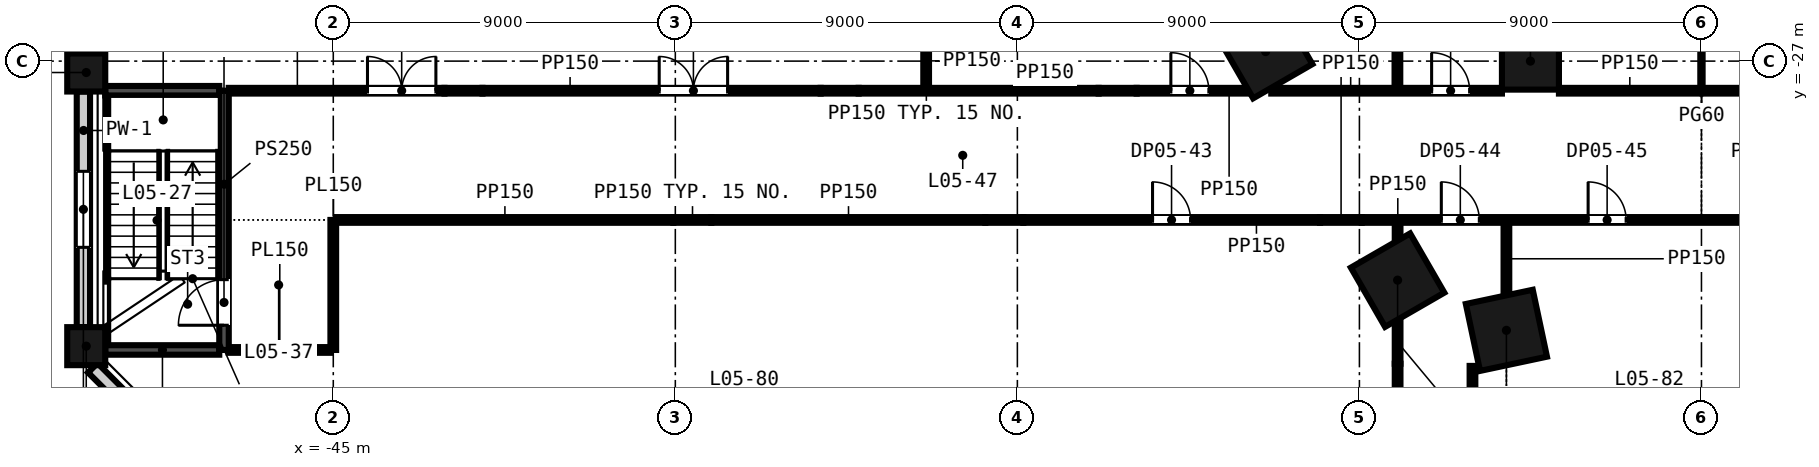
"""IFC4 building model, lengths in metres.
Left out: names, types, materials, properties, quantities, classifications, styles, units other than length and angle.
Written with IfcOpenShell. Run it as: python <this file> out.ifc"""

import sys

from ifc_helpers import new_model, si_unit, direction, frame, frame_2d, origin, origin_2d, place, context, subcontext, project, spatial, rectangle, extrude, element, fill, save


model = new_model("IFC4")
c1 = context("Model", 3, precision=1e-05, world=origin(), true_north=direction((0.0, 1.0)))
c2 = subcontext(c1, "Body", "Model", "MODEL_VIEW")
j1 = project(units=[si_unit("LENGTHUNIT", "METRE"), si_unit("PLANEANGLEUNIT", "RADIAN")], contexts=[c1])
p1 = place(None, origin())
s1 = spatial("IfcSite", under=j1, at=p1, CompositionType="ELEMENT")
p2 = place(p1, origin())
s2 = spatial("IfcBuilding", under=s1, at=p2, CompositionType="ELEMENT")
p3 = place(p2, frame((0.0, 0.0, 31.5)))
s3 = spatial("IfcBuildingStorey", under=s2, at=p3, CompositionType="ELEMENT", Elevation=31.5)
for number, where, z_axis, x_axis in (
    (1, (-20.467, -26.75, -0.3), (0.0, 0.0, 1.0), (0.5, -0.866, 0.0)),
    (2, (-16.995, -32.763, -0.3), (0.0, 0.0, 1.0), (0.5, -0.866, 0.0)),
    (3, (-14.132, -34.084, -0.3), (0.0, 0.0, 1.0), (0.978, 0.208, 0.0)),
):
    element("IfcColumn", number, at=place(p3, frame(where, z_axis=z_axis, x_axis=x_axis)), inside=s3, PredefinedType="COLUMN", context=c2, shape_type="SweptSolid", body=[
        extrude(rectangle(XDim=1.8, YDim=1.8, at=origin_2d()), origin(), (0.0, 0.0, 1.0), 4.65),
    ])
p4 = place(p3, frame((-13.5, -27.0, -0.3), z_axis=(0.0, 0.0, 1.0), x_axis=(1.0, 0.0, 0.0)))
e4 = element("IfcColumn", 4, at=p4, inside=s3, PredefinedType="COLUMN", context=c2, shape_type="SweptSolid", body=[
    extrude(rectangle(XDim=1.5, YDim=1.5, at=origin_2d()), origin(), (0.0, 0.0, 1.0), 4.65),
])
for number, where, z_axis, x_axis in (
    (5, (-51.5, -34.5, -0.3), (0.0, 0.0, 1.0), (0.0, -1.0, 0.0)),
    (6, (-51.5, -27.3, -0.3), (0.0, 0.0, 1.0), (0.0, 1.0, 0.0)),
):
    element("IfcColumn", number, at=place(p3, frame(where, z_axis=z_axis, x_axis=x_axis)), inside=s3, PredefinedType="COLUMN", context=c2, shape_type="SweptSolid", body=[
        extrude(rectangle(XDim=1.0, YDim=1.0, at=origin_2d()), origin(), (0.0, 0.0, 1.0), 4.65),
    ])
p5 = place(p3, frame((-51.575, -9.2, -0.3), z_axis=(0.0, 0.0, 1.0), x_axis=(0.0, -1.0, 0.0)))
e7 = element("IfcWall", 7, at=p5, inside=s3, PredefinedType="SOLIDWALL", context=c2, shape_type="SweptSolid", body=[
    extrude(rectangle(XDim=17.6, YDim=0.35, at=frame_2d((8.8, 0.0))), origin(), (0.0, 0.0, 1.0), 3.75),
])
p6 = place(p3, frame((-51.575, -27.8, -0.3), z_axis=(0.0, 0.0, 1.0), x_axis=(0.0, -1.0, 0.0)))
e8 = element("IfcWall", 8, at=p6, inside=s3, PredefinedType="SOLIDWALL", context=c2, shape_type="SweptSolid", body=[
    extrude(rectangle(XDim=6.2, YDim=0.35, at=frame_2d((3.1, 0.0))), origin(), (0.0, 0.0, 1.0), 3.75),
])
p7 = place(p6, frame((2.1, 0.0, 1.2)))
e9 = element("IfcOpeningElement", 9, at=p7, cuts=e8, PredefinedType="OPENING", context=c2, shape_type="SweptSolid", body=[
    extrude(rectangle(XDim=2.0, YDim=2.5, at=frame_2d((1.0, 1.25))), frame((0.0, 0.185, 0.0), z_axis=(0.0, -1.0, 0.0), x_axis=(1.0, 0.0, 0.0)), (0.0, 0.0, 1.0), 0.37),
])
p8 = place(p3, frame((-51.327, -35.072, -0.3), z_axis=(0.0, 0.0, 1.0), x_axis=(0.707106781187, -0.707106781187, 0.0)))
e10 = element("IfcWall", 10, at=p8, inside=s3, PredefinedType="SOLIDWALL", context=c2, shape_type="SweptSolid", body=[
    extrude(rectangle(XDim=7.433, YDim=0.35, at=frame_2d((3.716, 0.0))), origin(), (0.0, 0.0, 1.0), 3.75),
])
p9 = place(p3, frame((-51.0, -34.6, 0.0), z_axis=(0.0, 0.0, 1.0), x_axis=(1.0, 0.0, 0.0)))
e11 = element("IfcWall", 11, at=p9, inside=s3, PredefinedType="SHEAR", context=c2, shape_type="SweptSolid", body=[
    extrude(rectangle(XDim=3.0, YDim=0.25, at=frame_2d((1.5, 0.0))), origin(), (0.0, 0.0, 1.0), 4.35),
])
p10 = place(p3, frame((-47.75, -34.6, 0.0), z_axis=(0.0, 0.0, 1.0), x_axis=(1.0, 0.0, 0.0)))
e12 = element("IfcWall", 12, at=p10, inside=s3, PredefinedType="PARTITIONING", context=c2, shape_type="SweptSolid", body=[
    extrude(rectangle(XDim=2.675, YDim=0.15, at=frame_2d((1.337, 0.0))), origin(), (0.0, 0.0, 1.0), 4.35),
])
p11 = place(p3, frame((-44.925, -31.179, 0.0), z_axis=(0.0, 0.0, 1.0), x_axis=(1.0, 0.0, 0.0)))
e13 = element("IfcWall", 13, at=p11, inside=s3, PredefinedType="PARTITIONING", context=c2, shape_type="SweptSolid", body=[
    extrude(rectangle(XDim=8.872, YDim=0.15, at=frame_2d((4.436, 0.0))), origin(), (0.0, 0.0, 1.0), 4.35),
])
p12 = place(p3, frame((-36.053, -31.179, 0.0), z_axis=(0.0, 0.0, 1.0), x_axis=(1.0, 0.0, 0.0)))
e14 = element("IfcWall", 14, at=p12, inside=s3, PredefinedType="PARTITIONING", context=c2, shape_type="SweptSolid", body=[
    extrude(rectangle(XDim=1.0, YDim=0.15, at=frame_2d((0.5, 0.0))), origin(), (0.0, 0.0, 1.0), 3.261),
])
p13 = place(p3, frame((-35.053, -31.179, 0.0), z_axis=(0.0, 0.0, 1.0), x_axis=(1.0, 0.0, 0.0)))
e15 = element("IfcWall", 15, at=p13, inside=s3, PredefinedType="PARTITIONING", context=c2, shape_type="SweptSolid", body=[
    extrude(rectangle(XDim=7.209, YDim=0.15, at=frame_2d((3.605, 0.0))), origin(), (0.0, 0.0, 1.0), 4.35),
])
p14 = place(p3, frame((-27.843, -31.179, 0.0), z_axis=(0.0, 0.0, 1.0), x_axis=(1.0, 0.0, 0.0)))
e16 = element("IfcWall", 16, at=p14, inside=s3, PredefinedType="PARTITIONING", context=c2, shape_type="SweptSolid", body=[
    extrude(rectangle(XDim=1.0, YDim=0.15, at=frame_2d((0.5, 0.0))), origin(), (0.0, 0.0, 1.0), 3.436),
])
p15 = place(p3, frame((-26.843, -31.179, 0.0), z_axis=(0.0, 0.0, 1.0), x_axis=(1.0, 0.0, 0.0)))
e17 = element("IfcWall", 17, at=p15, inside=s3, PredefinedType="PARTITIONING", context=c2, shape_type="SweptSolid", body=[
    extrude(rectangle(XDim=7.807, YDim=0.15, at=frame_2d((3.904, 0.0))), origin(), (0.0, 0.0, 1.0), 4.35),
])
p16 = place(p15, frame((3.4, 0.0, 0.0)))
e18 = element("IfcOpeningElement", 18, at=p16, cuts=e17, PredefinedType="OPENING", context=c2, shape_type="SweptSolid", body=[
    extrude(rectangle(XDim=1.0, YDim=2.1, at=frame_2d((0.5, 1.05))), frame((0.0, 0.085, 0.0), z_axis=(0.0, -1.0, 0.0), x_axis=(1.0, 0.0, 0.0)), (0.0, 0.0, 1.0), 0.17),
])
p17 = place(p3, frame((-19.036, -31.179, 0.0), z_axis=(0.0, 0.0, 1.0), x_axis=(1.0, 0.0, 0.0)))
e19 = element("IfcWall", 19, at=p17, inside=s3, PredefinedType="PARTITIONING", context=c2, shape_type="SweptSolid", body=[
    extrude(rectangle(XDim=1.097, YDim=0.15, at=frame_2d((0.548, 0.0))), origin(), (0.0, 0.0, 1.0), 3.5),
])
p18 = place(p3, frame((-17.939, -31.179, 0.0), z_axis=(0.0, 0.0, 1.0), x_axis=(1.0, 0.0, 0.0)))
e20 = element("IfcWall", 20, at=p18, inside=s3, PredefinedType="PARTITIONING", context=c2, shape_type="SweptSolid", body=[
    extrude(rectangle(XDim=17.593, YDim=0.15, at=frame_2d((8.796, 0.0))), origin(), (0.0, 0.0, 1.0), 4.35),
])
p19 = place(p18, frame((2.094, 0.0, 0.0)))
e21 = element("IfcOpeningElement", 21, at=p19, cuts=e20, PredefinedType="OPENING", context=c2, shape_type="SweptSolid", body=[
    extrude(rectangle(XDim=1.0, YDim=2.1, at=frame_2d((0.5, 1.05))), frame((0.0, 0.085, 0.0), z_axis=(0.0, -1.0, 0.0), x_axis=(1.0, 0.0, 0.0)), (0.0, 0.0, 1.0), 0.17),
])
p20 = place(p18, frame((5.957, 0.0, 0.0)))
e22 = element("IfcOpeningElement", 22, at=p20, cuts=e20, PredefinedType="OPENING", context=c2, shape_type="SweptSolid", body=[
    extrude(rectangle(XDim=1.0, YDim=2.1, at=frame_2d((0.5, 1.05))), frame((0.0, 0.085, 0.0), z_axis=(0.0, -1.0, 0.0), x_axis=(1.0, 0.0, 0.0)), (0.0, 0.0, 1.0), 0.17),
])
p21 = place(p18, frame((13.978, 0.0, 0.0)))
e23 = element("IfcOpeningElement", 23, at=p21, cuts=e20, PredefinedType="OPENING", context=c2, shape_type="SweptSolid", body=[
    extrude(rectangle(XDim=1.0, YDim=2.1, at=frame_2d((0.5, 1.05))), frame((0.0, 0.085, 0.0), z_axis=(0.0, -1.0, 0.0), x_axis=(1.0, 0.0, 0.0)), (0.0, 0.0, 1.0), 0.17),
])
p22 = place(p3, frame((-51.0, -27.779, 0.0), z_axis=(0.0, 0.0, 1.0), x_axis=(1.0, 0.0, 0.0)))
e24 = element("IfcWall", 24, at=p22, inside=s3, PredefinedType="SHEAR", context=c2, shape_type="SweptSolid", body=[
    extrude(rectangle(XDim=3.0, YDim=0.25, at=frame_2d((1.5, 0.0))), origin(), (0.0, 0.0, 1.0), 4.35),
])
p23 = place(p3, frame((-47.75, -27.779, 0.0), z_axis=(0.0, 0.0, 1.0), x_axis=(1.0, 0.0, 0.0)))
e25 = element("IfcWall", 25, at=p23, inside=s3, PredefinedType="PARTITIONING", context=c2, shape_type="SweptSolid", body=[
    extrude(rectangle(XDim=5.676, YDim=0.15, at=frame_2d((2.838, 0.0))), origin(), (0.0, 0.0, 1.0), 4.35),
])
p24 = place(p23, frame((3.65, 0.0, 0.0)))
e26 = element("IfcOpeningElement", 26, at=p24, cuts=e25, PredefinedType="OPENING", context=c2, shape_type="SweptSolid", body=[
    extrude(rectangle(XDim=1.8, YDim=2.4, at=frame_2d((0.9, 1.2))), frame((0.0, 0.085, 0.0), z_axis=(0.0, -1.0, 0.0), x_axis=(1.0, 0.0, 0.0)), (0.0, 0.0, 1.0), 0.17),
])
p25 = place(p3, frame((-42.074, -27.779, 0.0), z_axis=(0.0, 0.0, 1.0), x_axis=(1.0, 0.0, 0.0)))
e27 = element("IfcWall", 27, at=p25, inside=s3, PredefinedType="PARTITIONING", context=c2, shape_type="SweptSolid", body=[
    extrude(rectangle(XDim=1.0, YDim=0.15, at=frame_2d((0.5, 0.0))), origin(), (0.0, 0.0, 1.0), 3.261),
])
p26 = place(p3, frame((-41.074, -27.779, 0.0), z_axis=(0.0, 0.0, 1.0), x_axis=(1.0, 0.0, 0.0)))
e28 = element("IfcWall", 28, at=p26, inside=s3, PredefinedType="PARTITIONING", context=c2, shape_type="SweptSolid", body=[
    extrude(rectangle(XDim=8.898, YDim=0.15, at=frame_2d((4.449, 0.0))), origin(), (0.0, 0.0, 1.0), 4.35),
])
p27 = place(p26, frame((4.65, 0.0, 0.0)))
e29 = element("IfcOpeningElement", 29, at=p27, cuts=e28, PredefinedType="OPENING", context=c2, shape_type="SweptSolid", body=[
    extrude(rectangle(XDim=1.8, YDim=2.4, at=frame_2d((0.9, 1.2))), frame((0.0, 0.085, 0.0), z_axis=(0.0, -1.0, 0.0), x_axis=(1.0, 0.0, 0.0)), (0.0, 0.0, 1.0), 0.17),
])
p28 = place(p3, frame((-32.176, -27.779, 0.0), z_axis=(0.0, 0.0, 1.0), x_axis=(1.0, 0.0, 0.0)))
e30 = element("IfcWall", 30, at=p28, inside=s3, PredefinedType="PARTITIONING", context=c2, shape_type="SweptSolid", body=[
    extrude(rectangle(XDim=1.0, YDim=0.15, at=frame_2d((0.5, 0.0))), origin(), (0.0, 0.0, 1.0), 3.261),
])
p29 = place(p3, frame((-31.176, -27.779, 0.0), z_axis=(0.0, 0.0, 1.0), x_axis=(1.0, 0.0, 0.0)))
e31 = element("IfcWall", 31, at=p29, inside=s3, PredefinedType="PARTITIONING", context=c2, shape_type="SweptSolid", body=[
    extrude(rectangle(XDim=6.314, YDim=0.15, at=frame_2d((3.157, 0.0))), origin(), (0.0, 0.0, 1.0), 4.35),
])
p30 = place(p3, frame((-24.862, -27.779, 0.0), z_axis=(0.0, 0.0, 1.0), x_axis=(1.0, 0.0, 0.0)))
e32 = element("IfcWall", 32, at=p30, inside=s3, PredefinedType="PARTITIONING", context=c2, shape_type="SweptSolid", body=[
    extrude(rectangle(XDim=1.0, YDim=0.15, at=frame_2d((0.5, 0.0))), origin(), (0.0, 0.0, 1.0), 3.436),
])
p31 = place(p3, frame((-23.862, -27.779, 0.0), z_axis=(0.0, 0.0, 1.0), x_axis=(1.0, 0.0, 0.0)))
e33 = element("IfcWall", 33, at=p31, inside=s3, PredefinedType="PARTITIONING", context=c2, shape_type="SweptSolid", body=[
    extrude(rectangle(XDim=2.906, YDim=0.15, at=frame_2d((1.453, 0.0))), origin(), (0.0, 0.0, 1.0), 4.35),
])
p32 = place(p31, frame((0.9, 0.0, 0.0)))
e34 = element("IfcOpeningElement", 34, at=p32, cuts=e33, PredefinedType="OPENING", context=c2, shape_type="SweptSolid", body=[
    extrude(rectangle(XDim=1.0, YDim=2.1, at=frame_2d((0.5, 1.05))), frame((0.0, 0.085, 0.0), z_axis=(0.0, -1.0, 0.0), x_axis=(1.0, 0.0, 0.0)), (0.0, 0.0, 1.0), 0.17),
])
p33 = place(p3, frame((-20.319, -27.779, 0.0), z_axis=(0.0, 0.0, 1.0), x_axis=(1.0, 0.0, 0.0)))
e35 = element("IfcWall", 35, at=p33, inside=s3, PredefinedType="PARTITIONING", context=c2, shape_type="SweptSolid", body=[
    extrude(rectangle(XDim=6.069, YDim=0.15, at=frame_2d((3.035, 0.0))), origin(), (0.0, 0.0, 1.0), 4.35),
])
p34 = place(p33, frame((4.219, 0.0, 0.0)))
e36 = element("IfcOpeningElement", 36, at=p34, cuts=e35, PredefinedType="OPENING", context=c2, shape_type="SweptSolid", body=[
    extrude(rectangle(XDim=1.0, YDim=2.1, at=frame_2d((0.5, 1.05))), frame((0.0, 0.085, 0.0), z_axis=(0.0, -1.0, 0.0), x_axis=(1.0, 0.0, 0.0)), (0.0, 0.0, 1.0), 0.17),
])
p35 = place(p3, frame((-12.75, -27.779, 0.0), z_axis=(0.0, 0.0, 1.0), x_axis=(1.0, 0.0, 0.0)))
e37 = element("IfcWall", 37, at=p35, inside=s3, PredefinedType="PARTITIONING", context=c2, shape_type="SweptSolid", body=[
    extrude(rectangle(XDim=3.72, YDim=0.15, at=frame_2d((1.86, 0.0))), origin(), (0.0, 0.0, 1.0), 4.35),
])
p36 = place(p3, frame((-8.97, -27.779, 0.0), z_axis=(0.0, 0.0, 1.0), x_axis=(1.0, 0.0, 0.0)))
e38 = element("IfcWall", 38, at=p36, inside=s3, PredefinedType="PARTITIONING", context=c2, shape_type="SweptSolid", body=[
    extrude(rectangle(XDim=8.22, YDim=0.15, at=frame_2d((4.11, 0.0))), origin(), (0.0, 0.0, 1.0), 4.35),
])
p37 = place(p3, frame((-47.875, -34.6, 0.0), z_axis=(0.0, 0.0, 1.0), x_axis=(0.0, 1.0, 0.0)))
e39 = element("IfcWall", 39, at=p37, inside=s3, PredefinedType="SHEAR", context=c2, shape_type="SweptSolid", body=[
    extrude(rectangle(XDim=6.821, YDim=0.25, at=frame_2d((3.411, 0.0))), origin(), (0.0, 0.0, 1.0), 4.35),
])
p38 = place(p37, frame((0.65, 0.0, 0.0)))
e40 = element("IfcOpeningElement", 40, at=p38, cuts=e39, PredefinedType="OPENING", context=c2, shape_type="SweptSolid", body=[
    extrude(rectangle(XDim=1.2, YDim=2.1, at=frame_2d((0.6, 1.05))), frame((0.0, 0.135, 0.0), z_axis=(0.0, -1.0, 0.0), x_axis=(1.0, 0.0, 0.0)), (0.0, 0.0, 1.0), 0.27),
])
p39 = place(p3, frame((-45.0, -34.6, 0.0), z_axis=(0.0, 0.0, 1.0), x_axis=(0.0, 1.0, 0.0)))
e41 = element("IfcWall", 41, at=p39, inside=s3, PredefinedType="PARTITIONING", context=c2, shape_type="SweptSolid", body=[
    extrude(rectangle(XDim=3.421, YDim=0.15, at=frame_2d((1.71, 0.0))), origin(), (0.0, 0.0, 1.0), 4.35),
])
p40 = place(p3, frame((-29.4, -27.704, 0.0), z_axis=(0.0, 0.0, 1.0), x_axis=(0.0, 1.0, 0.0)))
e42 = element("IfcWall", 42, at=p40, inside=s3, PredefinedType="PARTITIONING", context=c2, shape_type="SweptSolid", body=[
    extrude(rectangle(XDim=1.421, YDim=0.15, at=frame_2d((0.71, 0.0))), origin(), (0.0, 0.0, 1.0), 4.35),
])
p41 = place(p3, frame((-17.0, -27.704, 0.0), z_axis=(0.0, 0.0, 1.0), x_axis=(0.0, 1.0, 0.0)))
e43 = element("IfcWall", 43, at=p41, inside=s3, PredefinedType="PARTITIONING", context=c2, shape_type="SweptSolid", body=[
    extrude(rectangle(XDim=12.14, YDim=0.15, at=frame_2d((6.07, 0.0))), origin(), (0.0, 0.0, 1.0), 4.35),
])
p42 = place(p3, frame((-16.995, -40.4, 0.0), z_axis=(0.0, 0.0, 1.0), x_axis=(0.0, 1.0, 0.0)))
e44 = element("IfcWall", 44, at=p42, inside=s3, PredefinedType="PARTITIONING", context=c2, shape_type="SweptSolid", body=[
    extrude(rectangle(XDim=5.438, YDim=0.15, at=frame_2d((2.719, 0.0))), origin(), (0.0, 0.0, 1.0), 4.35),
])
p43 = place(p3, frame((-16.995, -34.962, 0.0), z_axis=(0.0, 0.0, 1.0), x_axis=(0.0, 1.0, 0.0)))
e45 = element("IfcWall", 45, at=p43, inside=s3, PredefinedType="PARTITIONING", context=c2, shape_type="SweptSolid", body=[
    extrude(rectangle(XDim=1.117, YDim=0.15, at=frame_2d((0.558, 0.0))), origin(), (0.0, 0.0, 1.0), 3.826),
])
p44 = place(p3, frame((-16.995, -31.681, 0.0), z_axis=(0.0, 0.0, 1.0), x_axis=(0.0, 1.0, 0.0)))
e46 = element("IfcWall", 46, at=p44, inside=s3, PredefinedType="PARTITIONING", context=c2, shape_type="SweptSolid", body=[
    extrude(rectangle(XDim=0.427, YDim=0.15, at=frame_2d((0.213, 0.0))), origin(), (0.0, 0.0, 1.0), 4.35),
])
p45 = place(p3, frame((-15.025, -40.4, 0.0), z_axis=(0.0, 0.0, 1.0), x_axis=(0.0, 1.0, 0.0)))
e47 = element("IfcWall", 47, at=p45, inside=s3, PredefinedType="PARTITIONING", context=c2, shape_type="SweptSolid", body=[
    extrude(rectangle(XDim=5.38, YDim=0.15, at=frame_2d((2.69, 0.0))), origin(), (0.0, 0.0, 1.0), 4.35),
])
p46 = place(p3, frame((-14.132, -33.148, 0.0), z_axis=(0.0, 0.0, 1.0), x_axis=(0.0, 1.0, 0.0)))
e48 = element("IfcWall", 48, at=p46, inside=s3, PredefinedType="PARTITIONING", context=c2, shape_type="SweptSolid", body=[
    extrude(rectangle(XDim=1.894, YDim=0.15, at=frame_2d((0.947, 0.0))), origin(), (0.0, 0.0, 1.0), 4.35),
])
p47 = place(p3, frame((-9.0, -27.778, 0.0), z_axis=(0.0, 0.0, 1.0), x_axis=(0.0, 1.0, 0.0)))
e49 = element("IfcWall", 49, at=p47, inside=s3, PredefinedType="PARTITIONING", context=c2, shape_type="SweptSolid", body=[
    extrude(rectangle(XDim=12.288, YDim=0.06, at=frame_2d((6.144, 0.0))), origin(), (0.0, 0.0, 1.0), 4.35),
])
p48 = place(p7, origin())
e50 = element("IfcWindow", 50, at=p48, inside=s3, PartitioningType="SINGLE_PANEL", PredefinedType="WINDOW", context=c2, shape_type="SweptSolid", body=[
    extrude(rectangle(XDim=2.0, YDim=2.5, at=frame_2d((1.0, 1.25))), frame((0.0, 0.03, 0.0), z_axis=(0.0, -1.0, 0.0), x_axis=(1.0, 0.0, 0.0)), (0.0, 0.0, 1.0), 0.06),
])
fill(e9, e50)
p49 = place(p38, origin())
e51 = element("IfcDoor", 51, at=p49, inside=s3, OperationType="SINGLE_SWING_LEFT", PredefinedType="DOOR", context=c2, shape_type="SweptSolid", body=[
    extrude(rectangle(XDim=1.2, YDim=2.1, at=frame_2d((0.6, 1.05))), frame((0.0, 0.025, 0.0), z_axis=(0.0, -1.0, 0.0), x_axis=(1.0, 0.0, 0.0)), (0.0, 0.0, 1.0), 0.05),
])
fill(e40, e51)
p50 = place(p24, origin())
e52 = element("IfcDoor", 52, at=p50, inside=s3, OperationType="SINGLE_SWING_LEFT", PredefinedType="DOOR", context=c2, shape_type="SweptSolid", body=[
    extrude(rectangle(XDim=1.8, YDim=2.4, at=frame_2d((0.9, 1.2))), frame((0.0, 0.025, 0.0), z_axis=(0.0, -1.0, 0.0), x_axis=(1.0, 0.0, 0.0)), (0.0, 0.0, 1.0), 0.05),
])
fill(e26, e52)
p51 = place(p27, origin())
e53 = element("IfcDoor", 53, at=p51, inside=s3, OperationType="SINGLE_SWING_LEFT", PredefinedType="DOOR", context=c2, shape_type="SweptSolid", body=[
    extrude(rectangle(XDim=1.8, YDim=2.4, at=frame_2d((0.9, 1.2))), frame((0.0, 0.025, 0.0), z_axis=(0.0, -1.0, 0.0), x_axis=(1.0, 0.0, 0.0)), (0.0, 0.0, 1.0), 0.05),
])
fill(e29, e53)
p52 = place(p32, origin())
e54 = element("IfcDoor", 54, at=p52, inside=s3, OperationType="SINGLE_SWING_LEFT", PredefinedType="DOOR", context=c2, shape_type="SweptSolid", body=[
    extrude(rectangle(XDim=1.0, YDim=2.1, at=frame_2d((0.5, 1.05))), frame((0.0, 0.025, 0.0), z_axis=(0.0, -1.0, 0.0), x_axis=(1.0, 0.0, 0.0)), (0.0, 0.0, 1.0), 0.05),
])
fill(e34, e54)
p53 = place(p34, origin())
e55 = element("IfcDoor", 55, at=p53, inside=s3, OperationType="SINGLE_SWING_LEFT", PredefinedType="DOOR", context=c2, shape_type="SweptSolid", body=[
    extrude(rectangle(XDim=1.0, YDim=2.1, at=frame_2d((0.5, 1.05))), frame((0.0, 0.025, 0.0), z_axis=(0.0, -1.0, 0.0), x_axis=(1.0, 0.0, 0.0)), (0.0, 0.0, 1.0), 0.05),
])
fill(e36, e55)
p54 = place(p16, origin())
e56 = element("IfcDoor", 56, at=p54, inside=s3, OperationType="SINGLE_SWING_LEFT", PredefinedType="DOOR", context=c2, shape_type="SweptSolid", body=[
    extrude(rectangle(XDim=1.0, YDim=2.1, at=frame_2d((0.5, 1.05))), frame((0.0, 0.025, 0.0), z_axis=(0.0, -1.0, 0.0), x_axis=(1.0, 0.0, 0.0)), (0.0, 0.0, 1.0), 0.05),
])
fill(e18, e56)
p55 = place(p19, origin())
e57 = element("IfcDoor", 57, at=p55, inside=s3, OperationType="SINGLE_SWING_LEFT", PredefinedType="DOOR", context=c2, shape_type="SweptSolid", body=[
    extrude(rectangle(XDim=1.0, YDim=2.1, at=frame_2d((0.5, 1.05))), frame((0.0, 0.025, 0.0), z_axis=(0.0, -1.0, 0.0), x_axis=(1.0, 0.0, 0.0)), (0.0, 0.0, 1.0), 0.05),
])
fill(e21, e57)
p56 = place(p20, origin())
e58 = element("IfcDoor", 58, at=p56, inside=s3, OperationType="SINGLE_SWING_LEFT", PredefinedType="DOOR", context=c2, shape_type="SweptSolid", body=[
    extrude(rectangle(XDim=1.0, YDim=2.1, at=frame_2d((0.5, 1.05))), frame((0.0, 0.025, 0.0), z_axis=(0.0, -1.0, 0.0), x_axis=(1.0, 0.0, 0.0)), (0.0, 0.0, 1.0), 0.05),
])
fill(e22, e58)
save(model, sys.argv[1])
